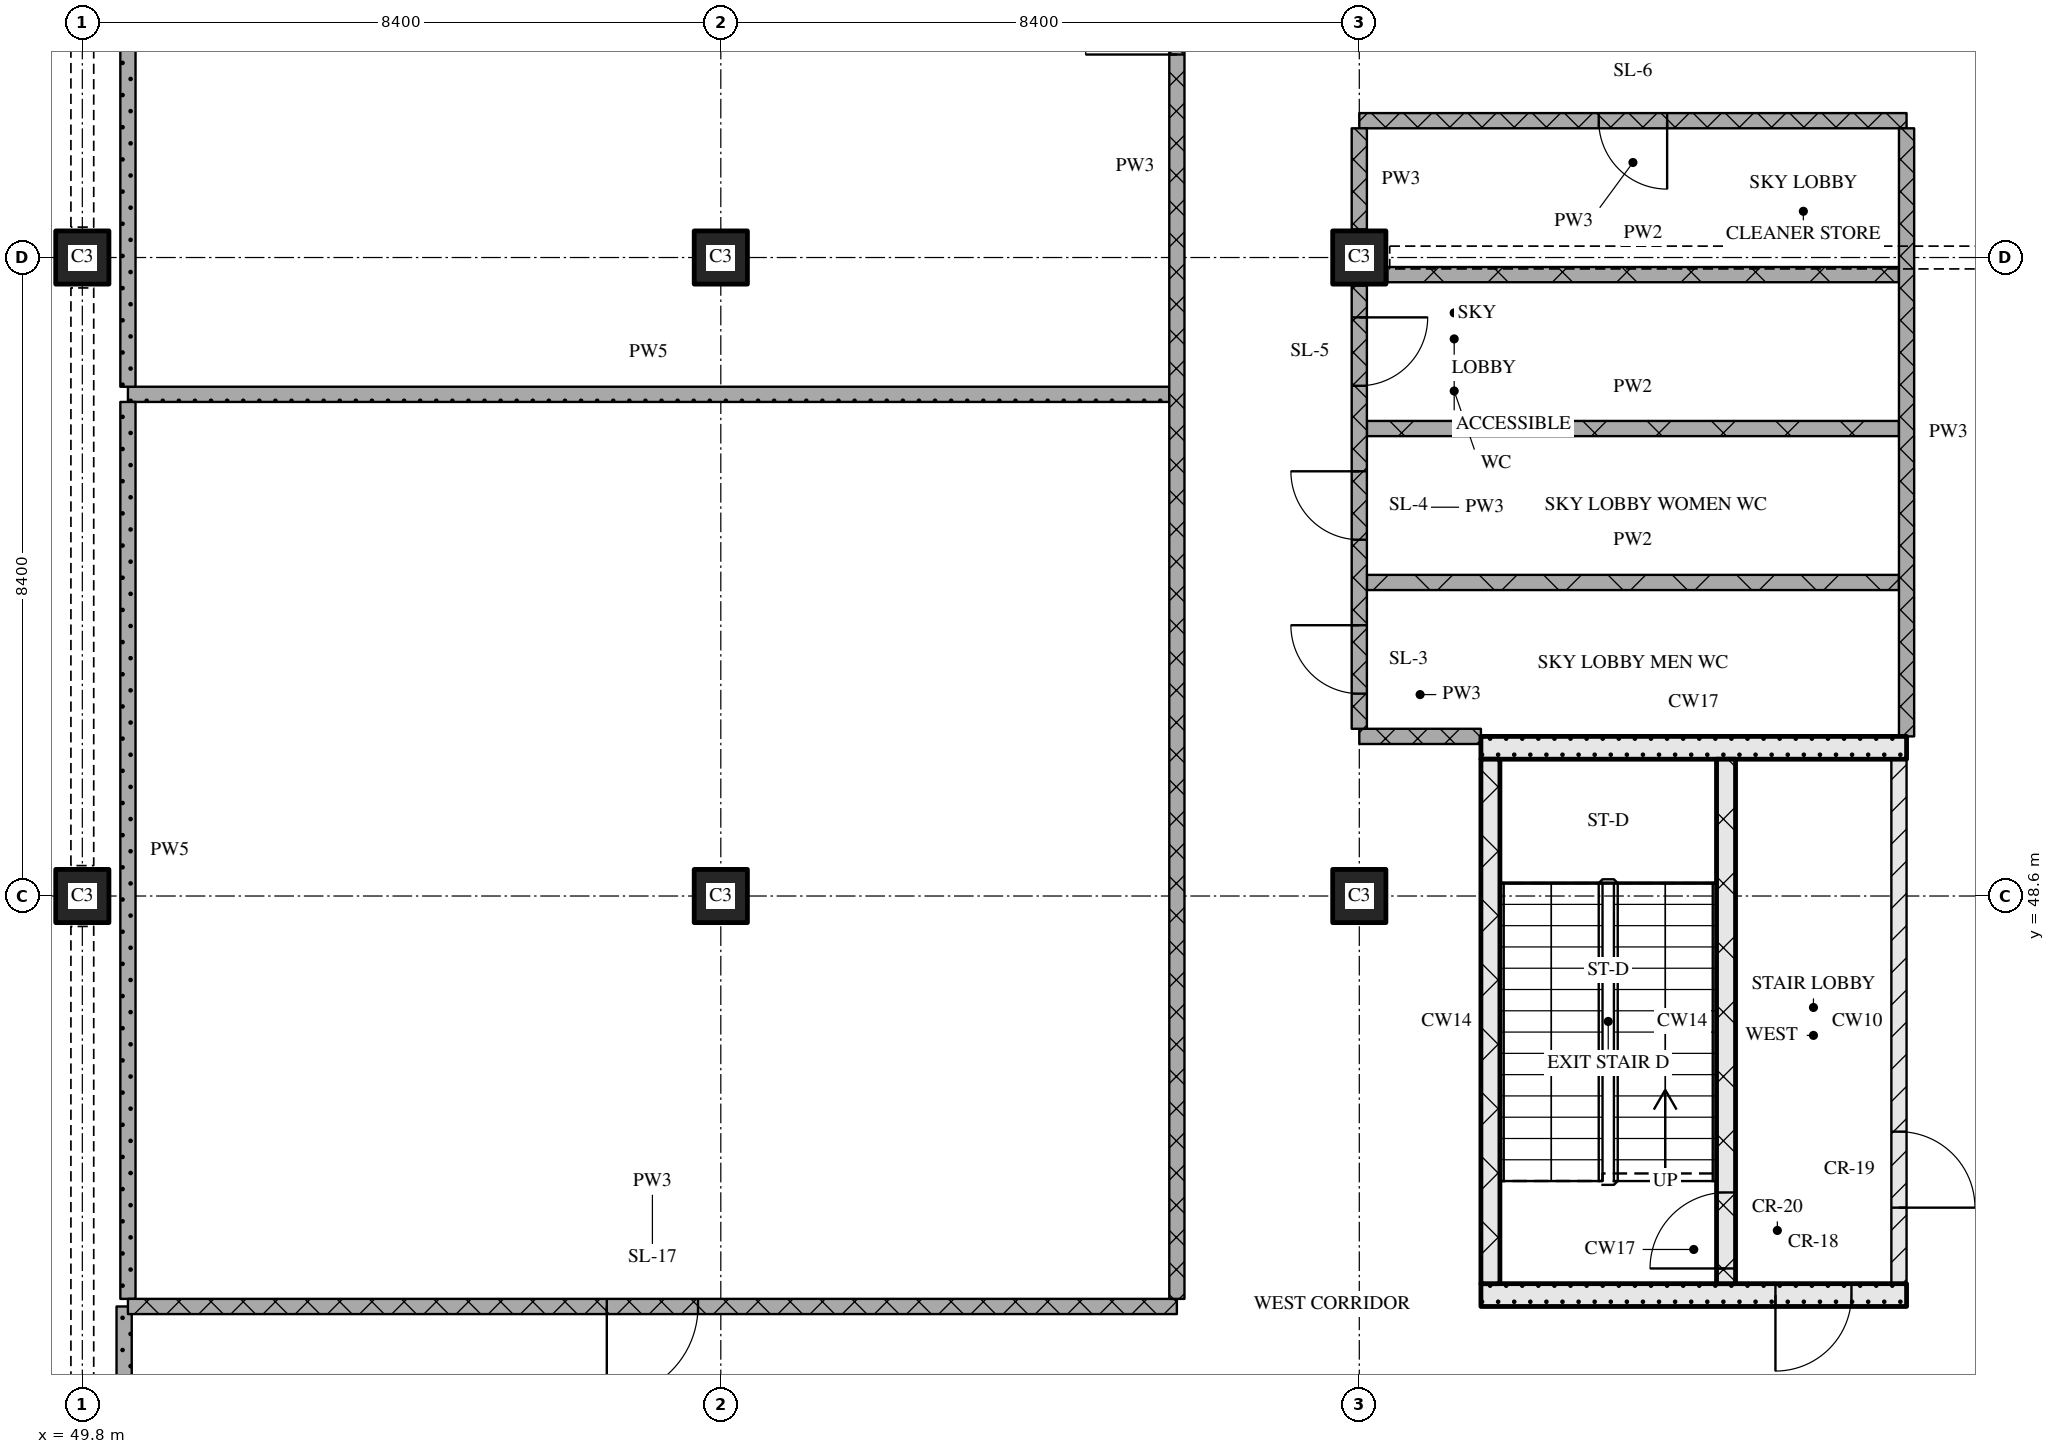
"""IFC4 building model, lengths in metres.
Left out: names, types, materials, properties, quantities, classifications, styles, units other than length and angle.
Written with IfcOpenShell. Run it as: python <this file> out.ifc"""

import sys

from ifc_helpers import new_model, si_unit, direction, frame, frame_2d, origin, origin_2d, place, context, subcontext, project, spatial, rectangle, extrude, element, fill, save


model = new_model("IFC4")
c1 = context("Model", 3, precision=1e-05, world=origin(), true_north=direction((0.0, 1.0)))
c2 = subcontext(c1, "Body", "Model", "MODEL_VIEW")
j1 = project(units=[si_unit("LENGTHUNIT", "METRE"), si_unit("PLANEANGLEUNIT", "RADIAN")], contexts=[c1])
p1 = place(None, origin())
s1 = spatial("IfcSite", under=j1, at=p1, CompositionType="ELEMENT")
p2 = place(p1, origin())
s2 = spatial("IfcBuilding", under=s1, at=p2, CompositionType="ELEMENT")
p3 = place(p2, frame((0.0, 0.0, 142.05)))
s3 = spatial("IfcBuildingStorey", under=s2, at=p3, CompositionType="ELEMENT", Elevation=142.05)
for number, where, z_axis, x_axis in (
    (1, (49.8, 48.6, 0.0), (0.0, 0.0, 1.0), (1.0, 0.0, 0.0)),
    (2, (49.8, 57.0, 0.0), (0.0, 0.0, 1.0), (1.0, 0.0, 0.0)),
    (3, (58.2, 48.6, 0.0), (0.0, 0.0, 1.0), (1.0, 0.0, 0.0)),
    (4, (58.2, 57.0, 0.0), (0.0, 0.0, 1.0), (1.0, 0.0, 0.0)),
    (5, (66.6, 48.6, 0.0), (0.0, 0.0, 1.0), (1.0, 0.0, 0.0)),
    (6, (66.6, 57.0, 0.0), (0.0, 0.0, 1.0), (1.0, 0.0, 0.0)),
):
    element("IfcColumn", number, at=place(p3, frame(where, z_axis=z_axis, x_axis=x_axis)), inside=s3, PredefinedType="COLUMN", context=c2, shape_type="SweptSolid", body=[
        extrude(rectangle(XDim=0.7, YDim=0.7, at=origin_2d()), origin(), (0.0, 0.0, 1.0), 5.4),
    ])
p4 = place(p3, frame((68.2, 43.35, 0.0), z_axis=(0.0, 0.0, 1.0), x_axis=(1.0, 0.0, 0.0)))
e7 = element("IfcWall", 7, at=p4, inside=s3, PredefinedType="SOLIDWALL", context=c2, shape_type="SweptSolid", body=[
    extrude(rectangle(XDim=5.6, YDim=0.3, at=frame_2d((2.8, 0.0))), origin(), (0.0, 0.0, 1.0), 5.12),
])
p5 = place(p4, frame((3.875, 0.0, 0.0)))
e8 = element("IfcOpeningElement", 8, at=p5, cuts=e7, PredefinedType="OPENING", context=c2, shape_type="SweptSolid", body=[
    extrude(rectangle(XDim=1.0, YDim=2.1, at=frame_2d((0.5, 1.05))), frame((0.0, 0.16, 0.0), z_axis=(0.0, -1.0, 0.0), x_axis=(1.0, 0.0, 0.0)), (0.0, 0.0, 1.0), 0.32),
])
p6 = place(p3, frame((68.325, 43.5, 0.0), z_axis=(0.0, 0.0, 1.0), x_axis=(0.0, 1.0, 0.0)))
e9 = element("IfcWall", 9, at=p6, inside=s3, PredefinedType="SOLIDWALL", context=c2, shape_type="SweptSolid", body=[
    extrude(rectangle(XDim=6.9, YDim=0.25, at=frame_2d((3.45, 0.0))), origin(), (0.0, 0.0, 1.0), 5.12),
])
p7 = place(p3, frame((71.425, 43.5, 0.0), z_axis=(0.0, 0.0, 1.0), x_axis=(0.0, 1.0, 0.0)))
e10 = element("IfcWall", 10, at=p7, inside=s3, PredefinedType="SOLIDWALL", context=c2, shape_type="SweptSolid", body=[
    extrude(rectangle(XDim=6.9, YDim=0.25, at=frame_2d((3.45, 0.0))), origin(), (0.0, 0.0, 1.0), 5.12),
])
p8 = place(p7, frame((0.2, 0.0, 0.0)))
e11 = element("IfcOpeningElement", 11, at=p8, cuts=e10, PredefinedType="OPENING", context=c2, shape_type="SweptSolid", body=[
    extrude(rectangle(XDim=1.0, YDim=2.1, at=frame_2d((0.5, 1.05))), frame((0.0, 0.135, 0.0), z_axis=(0.0, -1.0, 0.0), x_axis=(1.0, 0.0, 0.0)), (0.0, 0.0, 1.0), 0.27),
])
p9 = place(p3, frame((73.7, 43.5, 0.0), z_axis=(0.0, 0.0, 1.0), x_axis=(0.0, 1.0, 0.0)))
e12 = element("IfcWall", 12, at=p9, inside=s3, PredefinedType="PARTITIONING", context=c2, shape_type="SweptSolid", body=[
    extrude(rectangle(XDim=6.9, YDim=0.2, at=frame_2d((3.45, 0.0))), origin(), (0.0, 0.0, 1.0), 5.12),
])
p10 = place(p9, frame((1.0, 0.0, 0.0)))
e13 = element("IfcOpeningElement", 13, at=p10, cuts=e12, PredefinedType="OPENING", context=c2, shape_type="SweptSolid", body=[
    extrude(rectangle(XDim=1.0, YDim=2.1, at=frame_2d((0.5, 1.05))), frame((0.0, 0.11, 0.0), z_axis=(0.0, -1.0, 0.0), x_axis=(1.0, 0.0, 0.0)), (0.0, 0.0, 1.0), 0.22),
])
p11 = place(p3, frame((68.2, 50.55, 0.0), z_axis=(0.0, 0.0, 1.0), x_axis=(1.0, 0.0, 0.0)))
e14 = element("IfcWall", 14, at=p11, inside=s3, PredefinedType="SOLIDWALL", context=c2, shape_type="SweptSolid", body=[
    extrude(rectangle(XDim=5.6, YDim=0.3, at=frame_2d((2.8, 0.0))), origin(), (0.0, 0.0, 1.0), 5.12),
])
p12 = place(p3, frame((50.4, 43.2, 0.0), z_axis=(0.0, 0.0, 1.0), x_axis=(1.0, 0.0, 0.0)))
e15 = element("IfcWall", 15, at=p12, inside=s3, PredefinedType="PARTITIONING", context=c2, shape_type="SweptSolid", body=[
    extrude(rectangle(XDim=13.8, YDim=0.2, at=frame_2d((6.9, 0.0))), origin(), (0.0, 0.0, 1.0), 5.12),
])
p13 = place(p12, frame((6.3, 0.0, 0.0)))
e16 = element("IfcOpeningElement", 16, at=p13, cuts=e15, PredefinedType="OPENING", context=c2, shape_type="SweptSolid", body=[
    extrude(rectangle(XDim=1.2, YDim=2.1, at=frame_2d((0.6, 1.05))), frame((0.0, 0.11, 0.0), z_axis=(0.0, -1.0, 0.0), x_axis=(1.0, 0.0, 0.0)), (0.0, 0.0, 1.0), 0.22),
])
p14 = place(p3, frame((66.6, 50.7, 0.0), z_axis=(0.0, 0.0, 1.0), x_axis=(1.0, 0.0, 0.0)))
e17 = element("IfcWall", 17, at=p14, inside=s3, PredefinedType="PARTITIONING", context=c2, shape_type="SweptSolid", body=[
    extrude(rectangle(XDim=1.6, YDim=0.2, at=frame_2d((0.8, 0.0))), origin(), (0.0, 0.0, 1.0), 5.12),
])
for number, where, z_axis, x_axis in (
    (18, (66.7, 52.725, 0.0), (0.0, 0.0, 1.0), (1.0, 0.0, 0.0)),
    (19, (66.7, 54.75, 0.0), (0.0, 0.0, 1.0), (1.0, 0.0, 0.0)),
):
    element("IfcWall", number, at=place(p3, frame(where, z_axis=z_axis, x_axis=x_axis)), inside=s3, PredefinedType="PARTITIONING", context=c2, shape_type="SweptSolid", body=[
        extrude(rectangle(XDim=7.0, YDim=0.2, at=frame_2d((3.5, 0.0))), origin(), (0.0, 0.0, 1.0), 5.12),
    ])
p15 = place(p3, frame((50.4, 55.2, 0.0), z_axis=(0.0, 0.0, 1.0), x_axis=(1.0, 0.0, 0.0)))
e20 = element("IfcWall", 20, at=p15, inside=s3, PredefinedType="PARTITIONING", context=c2, shape_type="SweptSolid", body=[
    extrude(rectangle(XDim=13.7, YDim=0.2, at=frame_2d((6.85, 0.0))), origin(), (0.0, 0.0, 1.0), 5.12),
])
p16 = place(p3, frame((66.97, 56.775, 0.0), z_axis=(0.0, 0.0, 1.0), x_axis=(1.0, 0.0, 0.0)))
e21 = element("IfcWall", 21, at=p16, inside=s3, PredefinedType="PARTITIONING", context=c2, shape_type="SweptSolid", body=[
    extrude(rectangle(XDim=6.73, YDim=0.2, at=frame_2d((3.365, 0.0))), origin(), (0.0, 0.0, 1.0), 5.12),
])
p17 = place(p3, frame((73.8, 58.8, 0.0), z_axis=(0.0, 0.0, 1.0), x_axis=(-1.0, 0.0, 0.0)))
e22 = element("IfcWall", 22, at=p17, inside=s3, PredefinedType="PARTITIONING", context=c2, shape_type="SweptSolid", body=[
    extrude(rectangle(XDim=7.2, YDim=0.2, at=frame_2d((3.6, 0.0))), origin(), (0.0, 0.0, 1.0), 5.12),
])
p18 = place(p17, frame((3.15, 0.0, 0.0)))
e23 = element("IfcOpeningElement", 23, at=p18, cuts=e22, PredefinedType="OPENING", context=c2, shape_type="SweptSolid", body=[
    extrude(rectangle(XDim=0.9, YDim=2.1, at=frame_2d((0.45, 1.05))), frame((0.0, 0.11, 0.0), z_axis=(0.0, -1.0, 0.0), x_axis=(1.0, 0.0, 0.0)), (0.0, 0.0, 1.0), 0.22),
])
p19 = place(p3, frame((50.35, 43.2, 0.0), z_axis=(0.0, 0.0, 1.0), x_axis=(0.0, -1.0, 0.0)))
e24 = element("IfcWall", 24, at=p19, inside=s3, PredefinedType="PARTITIONING", context=c2, shape_type="SweptSolid", body=[
    extrude(rectangle(XDim=2.08, YDim=0.2, at=frame_2d((1.04, 0.0))), origin(), (0.0, 0.0, 1.0), 5.12),
])
p20 = place(p3, frame((50.4, 55.1, 0.0), z_axis=(0.0, 0.0, 1.0), x_axis=(0.0, -1.0, 0.0)))
e25 = element("IfcWall", 25, at=p20, inside=s3, PredefinedType="PARTITIONING", context=c2, shape_type="SweptSolid", body=[
    extrude(rectangle(XDim=11.8, YDim=0.2, at=frame_2d((5.9, 0.0))), origin(), (0.0, 0.0, 1.0), 5.12),
])
p21 = place(p3, frame((50.4, 64.48, 0.0), z_axis=(0.0, 0.0, 1.0), x_axis=(0.0, -1.0, 0.0)))
e26 = element("IfcWall", 26, at=p21, inside=s3, PredefinedType="PARTITIONING", context=c2, shape_type="SweptSolid", body=[
    extrude(rectangle(XDim=9.18, YDim=0.2, at=frame_2d((4.59, 0.0))), origin(), (0.0, 0.0, 1.0), 5.12),
])
p22 = place(p3, frame((64.2, 43.3, 0.0), z_axis=(0.0, 0.0, 1.0), x_axis=(0.0, 1.0, 0.0)))
e27 = element("IfcWall", 27, at=p22, inside=s3, PredefinedType="PARTITIONING", context=c2, shape_type="SweptSolid", body=[
    extrude(rectangle(XDim=29.8, YDim=0.2, at=frame_2d((14.9, 0.0))), origin(), (0.0, 0.0, 1.0), 5.12),
])
p23 = place(p22, frame((16.371, 0.0, 0.0)))
e28 = element("IfcOpeningElement", 28, at=p23, cuts=e27, PredefinedType="OPENING", context=c2, shape_type="SweptSolid", body=[
    extrude(rectangle(XDim=1.2, YDim=2.1, at=frame_2d((0.6, 1.05))), frame((0.0, 0.11, 0.0), z_axis=(0.0, -1.0, 0.0), x_axis=(1.0, 0.0, 0.0)), (0.0, 0.0, 1.0), 0.22),
])
p24 = place(p22, frame((24.818, 0.0, 0.0)))
e29 = element("IfcOpeningElement", 29, at=p24, cuts=e27, PredefinedType="OPENING", context=c2, shape_type="SweptSolid", body=[
    extrude(rectangle(XDim=1.2, YDim=2.1, at=frame_2d((0.6, 1.05))), frame((0.0, 0.11, 0.0), z_axis=(0.0, -1.0, 0.0), x_axis=(1.0, 0.0, 0.0)), (0.0, 0.0, 1.0), 0.22),
])
p25 = place(p3, frame((66.6, 56.63, 0.0), z_axis=(0.0, 0.0, 1.0), x_axis=(0.0, -1.0, 0.0)))
e30 = element("IfcWall", 30, at=p25, inside=s3, PredefinedType="PARTITIONING", context=c2, shape_type="SweptSolid", body=[
    extrude(rectangle(XDim=5.83, YDim=0.2, at=frame_2d((2.915, 0.0))), origin(), (0.0, 0.0, 1.0), 5.12),
])
p26 = place(p25, frame((0.417, 0.0, 0.0)))
e31 = element("IfcOpeningElement", 31, at=p26, cuts=e30, PredefinedType="OPENING", context=c2, shape_type="SweptSolid", body=[
    extrude(rectangle(XDim=0.9, YDim=2.1, at=frame_2d((0.45, 1.05))), frame((0.0, 0.11, 0.0), z_axis=(0.0, -1.0, 0.0), x_axis=(1.0, 0.0, 0.0)), (0.0, 0.0, 1.0), 0.22),
])
p27 = place(p25, frame((2.442, 0.0, 0.0)))
e32 = element("IfcOpeningElement", 32, at=p27, cuts=e30, PredefinedType="OPENING", context=c2, shape_type="SweptSolid", body=[
    extrude(rectangle(XDim=0.9, YDim=2.1, at=frame_2d((0.45, 1.05))), frame((0.0, 0.11, 0.0), z_axis=(0.0, -1.0, 0.0), x_axis=(1.0, 0.0, 0.0)), (0.0, 0.0, 1.0), 0.22),
])
p28 = place(p25, frame((4.468, 0.0, 0.0)))
e33 = element("IfcOpeningElement", 33, at=p28, cuts=e30, PredefinedType="OPENING", context=c2, shape_type="SweptSolid", body=[
    extrude(rectangle(XDim=0.9, YDim=2.1, at=frame_2d((0.45, 1.05))), frame((0.0, 0.11, 0.0), z_axis=(0.0, -1.0, 0.0), x_axis=(1.0, 0.0, 0.0)), (0.0, 0.0, 1.0), 0.22),
])
p29 = place(p3, frame((66.6, 58.7, 0.0), z_axis=(0.0, 0.0, 1.0), x_axis=(0.0, -1.0, 0.0)))
e34 = element("IfcWall", 34, at=p29, inside=s3, PredefinedType="PARTITIONING", context=c2, shape_type="SweptSolid", body=[
    extrude(rectangle(XDim=1.33, YDim=0.2, at=frame_2d((0.665, 0.0))), origin(), (0.0, 0.0, 1.0), 5.12),
])
p30 = place(p3, frame((73.8, 58.7, 0.0), z_axis=(0.0, 0.0, 1.0), x_axis=(0.0, -1.0, 0.0)))
e35 = element("IfcWall", 35, at=p30, inside=s3, PredefinedType="PARTITIONING", context=c2, shape_type="SweptSolid", body=[
    extrude(rectangle(XDim=8.0, YDim=0.2, at=frame_2d((4.0, 0.0))), origin(), (0.0, 0.0, 1.0), 5.12),
])
p31 = place(p5, origin())
e36 = element("IfcDoor", 36, at=p31, inside=s3, OperationType="SINGLE_SWING_RIGHT", PredefinedType="DOOR", context=c2, shape_type="SweptSolid", body=[
    extrude(rectangle(XDim=1.0, YDim=2.1, at=frame_2d((0.5, 1.05))), frame((0.0, 0.025, 0.0), z_axis=(0.0, -1.0, 0.0), x_axis=(1.0, 0.0, 0.0)), (0.0, 0.0, 1.0), 0.05),
])
fill(e8, e36)
p32 = place(p8, origin())
e37 = element("IfcDoor", 37, at=p32, inside=s3, OperationType="SINGLE_SWING_LEFT", PredefinedType="DOOR", context=c2, shape_type="SweptSolid", body=[
    extrude(rectangle(XDim=1.0, YDim=2.1, at=frame_2d((0.5, 1.05))), frame((0.0, 0.025, 0.0), z_axis=(0.0, -1.0, 0.0), x_axis=(1.0, 0.0, 0.0)), (0.0, 0.0, 1.0), 0.05),
])
fill(e11, e37)
p33 = place(p10, origin())
e38 = element("IfcDoor", 38, at=p33, inside=s3, OperationType="SINGLE_SWING_RIGHT", PredefinedType="DOOR", context=c2, shape_type="SweptSolid", body=[
    extrude(rectangle(XDim=1.0, YDim=2.1, at=frame_2d((0.5, 1.05))), frame((0.0, 0.025, 0.0), z_axis=(0.0, -1.0, 0.0), x_axis=(1.0, 0.0, 0.0)), (0.0, 0.0, 1.0), 0.05),
])
fill(e13, e38)
p34 = place(p13, origin())
e39 = element("IfcDoor", 39, at=p34, inside=s3, OperationType="SINGLE_SWING_RIGHT", PredefinedType="DOOR", context=c2, shape_type="SweptSolid", body=[
    extrude(rectangle(XDim=1.2, YDim=2.1, at=frame_2d((0.6, 1.05))), frame((0.0, 0.025, 0.0), z_axis=(0.0, -1.0, 0.0), x_axis=(1.0, 0.0, 0.0)), (0.0, 0.0, 1.0), 0.05),
])
fill(e16, e39)
p35 = place(p18, origin())
e40 = element("IfcDoor", 40, at=p35, inside=s3, OperationType="SINGLE_SWING_LEFT", PredefinedType="DOOR", context=c2, shape_type="SweptSolid", body=[
    extrude(rectangle(XDim=0.9, YDim=2.1, at=frame_2d((0.45, 1.05))), frame((0.0, 0.025, 0.0), z_axis=(0.0, -1.0, 0.0), x_axis=(1.0, 0.0, 0.0)), (0.0, 0.0, 1.0), 0.05),
])
fill(e23, e40)
p36 = place(p23, origin())
e41 = element("IfcDoor", 41, at=p36, inside=s3, OperationType="SINGLE_SWING_LEFT", PredefinedType="DOOR", context=c2, shape_type="SweptSolid", body=[
    extrude(rectangle(XDim=1.2, YDim=2.1, at=frame_2d((0.6, 1.05))), frame((0.0, 0.025, 0.0), z_axis=(0.0, -1.0, 0.0), x_axis=(1.0, 0.0, 0.0)), (0.0, 0.0, 1.0), 0.05),
])
fill(e28, e41)
p37 = place(p26, origin())
e42 = element("IfcDoor", 42, at=p37, inside=s3, OperationType="SINGLE_SWING_LEFT", PredefinedType="DOOR", context=c2, shape_type="SweptSolid", body=[
    extrude(rectangle(XDim=0.9, YDim=2.1, at=frame_2d((0.45, 1.05))), frame((0.0, 0.025, 0.0), z_axis=(0.0, -1.0, 0.0), x_axis=(1.0, 0.0, 0.0)), (0.0, 0.0, 1.0), 0.05),
])
fill(e31, e42)
p38 = place(p27, origin())
e43 = element("IfcDoor", 43, at=p38, inside=s3, OperationType="SINGLE_SWING_RIGHT", PredefinedType="DOOR", context=c2, shape_type="SweptSolid", body=[
    extrude(rectangle(XDim=0.9, YDim=2.1, at=frame_2d((0.45, 1.05))), frame((0.0, 0.025, 0.0), z_axis=(0.0, -1.0, 0.0), x_axis=(1.0, 0.0, 0.0)), (0.0, 0.0, 1.0), 0.05),
])
fill(e32, e43)
p39 = place(p28, origin())
e44 = element("IfcDoor", 44, at=p39, inside=s3, OperationType="SINGLE_SWING_RIGHT", PredefinedType="DOOR", context=c2, shape_type="SweptSolid", body=[
    extrude(rectangle(XDim=0.9, YDim=2.1, at=frame_2d((0.45, 1.05))), frame((0.0, 0.025, 0.0), z_axis=(0.0, -1.0, 0.0), x_axis=(1.0, 0.0, 0.0)), (0.0, 0.0, 1.0), 0.05),
])
fill(e33, e44)
save(model, sys.argv[1])
